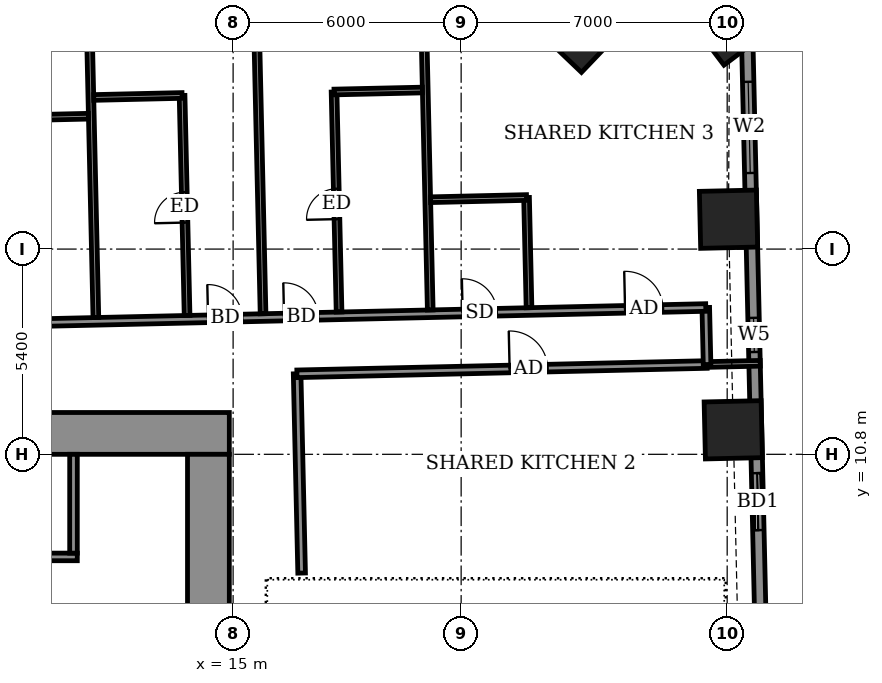
"""IFC4 building model, lengths in metres.
Left out: names, types, materials, properties, quantities, classifications, styles, units other than length and angle.
Written with IfcOpenShell. Run it as: python <this file> out.ifc"""

import sys

from ifc_helpers import new_model, si_unit, direction, frame, frame_2d, origin, origin_2d, place, context, subcontext, project, spatial, rectangle, extrude, element, fill, save


model = new_model("IFC4")
c1 = context("Model", 3, precision=1e-05, world=origin(), true_north=direction((0.0, 1.0)))
c2 = subcontext(c1, "Body", "Model", "MODEL_VIEW")
j1 = project(units=[si_unit("LENGTHUNIT", "METRE"), si_unit("PLANEANGLEUNIT", "RADIAN")], contexts=[c1])
p1 = place(None, origin())
s1 = spatial("IfcSite", under=j1, at=p1, CompositionType="ELEMENT")
p2 = place(p1, origin())
s2 = spatial("IfcBuilding", under=s1, at=p2, CompositionType="ELEMENT")
p3 = place(p2, frame((0.0, 0.0, 48.5)))
s3 = spatial("IfcBuildingStorey", under=s2, at=p3, CompositionType="ELEMENT", Elevation=48.5)
for number, where, z_axis, x_axis in (
    (1, (28.16, 11.445, -0.55), (0.0, 0.0, 1.0), (-0.023, 1.0, 0.0)),
    (2, (28.035, 16.986, -0.55), (0.0, 0.0, 1.0), (-0.023, 1.0, 0.0)),
    (3, (28.061, 22.09, -0.55), (0.0, 0.0, 1.0), (-0.604, 0.797, 0.0)),
    (4, (24.142, 21.91, -0.55), (0.0, 0.0, 1.0), (-0.723, 0.691, 0.0)),
):
    element("IfcColumn", number, at=place(p3, frame(where, z_axis=z_axis, x_axis=x_axis)), inside=s3, PredefinedType="COLUMN", context=c2, shape_type="SweptSolid", body=[
        extrude(rectangle(XDim=1.5, YDim=1.5, at=origin_2d()), origin(), (0.0, 0.0, 1.0), 3.6),
    ])
p4 = place(p3, frame((28.887, 5.864, 0.0), z_axis=(0.0, 0.0, 1.0), x_axis=(-0.022687182773, 0.999742612745, 0.0)))
e5 = element("IfcWall", 5, at=p4, inside=s3, PredefinedType="SOLIDWALL", context=c2, shape_type="SweptSolid", body=[
    extrude(rectangle(XDim=16.529, YDim=0.3, at=frame_2d((8.265, 0.0))), origin(), (0.0, 0.0, 1.0), 3.05),
])
p5 = place(p4, frame((2.942, 0.0, 0.0)))
e6 = element("IfcOpeningElement", 6, at=p5, cuts=e5, PredefinedType="OPENING", context=c2, shape_type="SweptSolid", body=[
    extrude(rectangle(XDim=1.5, YDim=2.4, at=frame_2d((0.75, 1.2))), frame((0.0, 0.16, 0.0), z_axis=(0.0, -1.0, 0.0), x_axis=(1.0, 0.0, 0.0)), (0.0, 0.0, 1.0), 0.32),
])
p6 = place(p4, frame((7.629, 0.0, 0.9)))
e7 = element("IfcOpeningElement", 7, at=p6, cuts=e5, PredefinedType="OPENING", context=c2, shape_type="SweptSolid", body=[
    extrude(rectangle(XDim=0.9, YDim=1.5, at=frame_2d((0.45, 0.75))), frame((0.0, 0.16, 0.0), z_axis=(0.0, -1.0, 0.0), x_axis=(1.0, 0.0, 0.0)), (0.0, 0.0, 1.0), 0.32),
])
p7 = place(p4, frame((12.341, 0.0, 0.9)))
e8 = element("IfcOpeningElement", 8, at=p7, cuts=e5, PredefinedType="OPENING", context=c2, shape_type="SweptSolid", body=[
    extrude(rectangle(XDim=2.4, YDim=1.5, at=frame_2d((1.2, 0.75))), frame((0.0, 0.16, 0.0), z_axis=(0.0, -1.0, 0.0), x_axis=(1.0, 0.0, 0.0)), (0.0, 0.0, 1.0), 0.32),
])
p8 = place(p3, frame((30.33, 6.201, 0.0), z_axis=(0.0, 0.0, 1.0), x_axis=(-0.022744303924, 0.999741314861, 0.0)))
e9 = element("IfcWall", 9, at=p8, inside=s3, PredefinedType="USERDEFINED", context=c2, shape_type="SweptSolid", body=[
    extrude(rectangle(XDim=3.875, YDim=0.55, at=frame_2d((1.938, 0.0))), origin(), (0.0, 0.0, 1.0), 0.8),
])
p9 = place(p3, frame((16.803, 7.675, 0.0), z_axis=(0.0, 0.0, 1.0), x_axis=(-0.022667483124, 0.999743059595, 0.0)))
e10 = element("IfcWall", 10, at=p9, inside=s3, PredefinedType="PARTITIONING", context=c2, shape_type="SweptSolid", body=[
    extrude(rectangle(XDim=5.245, YDim=0.2, at=frame_2d((2.623, 0.0))), origin(), (0.0, 0.0, 1.0), 3.05),
])
p10 = place(p3, frame((16.679, 12.918, 0.0), z_axis=(0.0, 0.0, 1.0), x_axis=(0.999742162372, 0.022707020428, 0.0)))
e11 = element("IfcWall", 11, at=p10, inside=s3, PredefinedType="PARTITIONING", context=c2, shape_type="SweptSolid", body=[
    extrude(rectangle(XDim=10.795, YDim=0.2, at=frame_2d((5.397, 0.0))), origin(), (0.0, 0.0, 1.0), 3.05),
])
p11 = place(p10, frame((5.598, 0.0, 0.0)))
e12 = element("IfcOpeningElement", 12, at=p11, cuts=e11, PredefinedType="OPENING", context=c2, shape_type="SweptSolid", body=[
    extrude(rectangle(XDim=1.0, YDim=2.1, at=frame_2d((0.5, 1.05))), frame((0.0, 0.11, 0.0), z_axis=(0.0, -1.0, 0.0), x_axis=(1.0, 0.0, 0.0)), (0.0, 0.0, 1.0), 0.22),
])
p12 = place(p3, frame((27.471, 13.163, 0.0), z_axis=(0.0, 0.0, 1.0), x_axis=(0.999739219063, 0.022836240226, 0.0)))
e13 = element("IfcWall", 13, at=p12, inside=s3, PredefinedType="PARTITIONING", context=c2, shape_type="SweptSolid", body=[
    extrude(rectangle(XDim=1.4, YDim=0.15, at=frame_2d((0.7, 0.0))), origin(), (0.0, 0.0, 1.0), 2.55),
])
p13 = place(p3, frame((27.471, 13.163, 0.0), z_axis=(0.0, 0.0, 1.0), x_axis=(-0.022617910375, 0.999744182344, 0.0)))
e14 = element("IfcWall", 14, at=p13, inside=s3, PredefinedType="PARTITIONING", context=c2, shape_type="SweptSolid", body=[
    extrude(rectangle(XDim=1.5, YDim=0.2, at=frame_2d((0.75, 0.0))), origin(), (0.0, 0.0, 1.0), 3.05),
])
p14 = place(p3, frame((-31.347, 13.329, 0.0), z_axis=(0.0, 0.0, 1.0), x_axis=(0.999742613079, 0.022687168058, 0.0)))
e15 = element("IfcWall", 15, at=p14, inside=s3, PredefinedType="PARTITIONING", context=c2, shape_type="SweptSolid", body=[
    extrude(rectangle(XDim=58.799, YDim=0.2, at=frame_2d((29.399, 0.0))), origin(), (0.0, 0.0, 1.0), 3.05),
])
p15 = place(p14, frame((56.675, 0.0, 0.0)))
e16 = element("IfcOpeningElement", 16, at=p15, cuts=e15, PredefinedType="OPENING", context=c2, shape_type="SweptSolid", body=[
    extrude(rectangle(XDim=1.0, YDim=2.1, at=frame_2d((0.5, 1.05))), frame((0.0, 0.11, 0.0), z_axis=(0.0, -1.0, 0.0), x_axis=(1.0, 0.0, 0.0)), (0.0, 0.0, 1.0), 0.22),
])
p16 = place(p14, frame((52.4, 0.0, 0.0)))
e17 = element("IfcOpeningElement", 17, at=p16, cuts=e15, PredefinedType="OPENING", context=c2, shape_type="SweptSolid", body=[
    extrude(rectangle(XDim=0.9, YDim=2.1, at=frame_2d((0.45, 1.05))), frame((0.0, 0.11, 0.0), z_axis=(0.0, -1.0, 0.0), x_axis=(1.0, 0.0, 0.0)), (0.0, 0.0, 1.0), 0.22),
])
p17 = place(p14, frame((47.7, 0.0, 0.0)))
e18 = element("IfcOpeningElement", 18, at=p17, cuts=e15, PredefinedType="OPENING", context=c2, shape_type="SweptSolid", body=[
    extrude(rectangle(XDim=0.9, YDim=2.1, at=frame_2d((0.45, 1.05))), frame((0.0, 0.11, 0.0), z_axis=(0.0, -1.0, 0.0), x_axis=(1.0, 0.0, 0.0)), (0.0, 0.0, 1.0), 0.22),
])
p18 = place(p14, frame((45.7, 0.0, 0.0)))
e19 = element("IfcOpeningElement", 19, at=p18, cuts=e15, PredefinedType="OPENING", context=c2, shape_type="SweptSolid", body=[
    extrude(rectangle(XDim=0.9, YDim=2.1, at=frame_2d((0.45, 1.05))), frame((0.0, 0.11, 0.0), z_axis=(0.0, -1.0, 0.0), x_axis=(1.0, 0.0, 0.0)), (0.0, 0.0, 1.0), 0.22),
])
p19 = place(p14, frame((38.95, 0.0, 0.0)))
e20 = element("IfcOpeningElement", 20, at=p19, cuts=e15, PredefinedType="OPENING", context=c2, shape_type="SweptSolid", body=[
    extrude(rectangle(XDim=0.9, YDim=2.1, at=frame_2d((0.45, 1.05))), frame((0.0, 0.11, 0.0), z_axis=(0.0, -1.0, 0.0), x_axis=(1.0, 0.0, 0.0)), (0.0, 0.0, 1.0), 0.22),
])
p20 = place(p14, frame((37.05, 0.0, 0.0)))
e21 = element("IfcOpeningElement", 21, at=p20, cuts=e15, PredefinedType="OPENING", context=c2, shape_type="SweptSolid", body=[
    extrude(rectangle(XDim=0.9, YDim=2.1, at=frame_2d((0.45, 1.05))), frame((0.0, 0.11, 0.0), z_axis=(0.0, -1.0, 0.0), x_axis=(1.0, 0.0, 0.0)), (0.0, 0.0, 1.0), 0.22),
])
p21 = place(p14, frame((30.375, 0.0, 0.0)))
e22 = element("IfcOpeningElement", 22, at=p21, cuts=e15, PredefinedType="OPENING", context=c2, shape_type="SweptSolid", body=[
    extrude(rectangle(XDim=0.9, YDim=2.1, at=frame_2d((0.45, 1.05))), frame((0.0, 0.11, 0.0), z_axis=(0.0, -1.0, 0.0), x_axis=(1.0, 0.0, 0.0)), (0.0, 0.0, 1.0), 0.22),
])
p22 = place(p14, frame((28.5, 0.0, 0.0)))
e23 = element("IfcOpeningElement", 23, at=p22, cuts=e15, PredefinedType="OPENING", context=c2, shape_type="SweptSolid", body=[
    extrude(rectangle(XDim=0.9, YDim=2.1, at=frame_2d((0.45, 1.05))), frame((0.0, 0.11, 0.0), z_axis=(0.0, -1.0, 0.0), x_axis=(1.0, 0.0, 0.0)), (0.0, 0.0, 1.0), 0.22),
])
p23 = place(p14, frame((21.825, 0.0, 0.0)))
e24 = element("IfcOpeningElement", 24, at=p23, cuts=e15, PredefinedType="OPENING", context=c2, shape_type="SweptSolid", body=[
    extrude(rectangle(XDim=0.9, YDim=2.1, at=frame_2d((0.45, 1.05))), frame((0.0, 0.11, 0.0), z_axis=(0.0, -1.0, 0.0), x_axis=(1.0, 0.0, 0.0)), (0.0, 0.0, 1.0), 0.22),
])
p24 = place(p14, frame((19.95, 0.0, 0.0)))
e25 = element("IfcOpeningElement", 25, at=p24, cuts=e15, PredefinedType="OPENING", context=c2, shape_type="SweptSolid", body=[
    extrude(rectangle(XDim=0.9, YDim=2.1, at=frame_2d((0.45, 1.05))), frame((0.0, 0.11, 0.0), z_axis=(0.0, -1.0, 0.0), x_axis=(1.0, 0.0, 0.0)), (0.0, 0.0, 1.0), 0.22),
])
p25 = place(p14, frame((13.225, 0.0, 0.0)))
e26 = element("IfcOpeningElement", 26, at=p25, cuts=e15, PredefinedType="OPENING", context=c2, shape_type="SweptSolid", body=[
    extrude(rectangle(XDim=0.9, YDim=2.1, at=frame_2d((0.45, 1.05))), frame((0.0, 0.11, 0.0), z_axis=(0.0, -1.0, 0.0), x_axis=(1.0, 0.0, 0.0)), (0.0, 0.0, 1.0), 0.22),
])
p26 = place(p14, frame((11.25, 0.0, 0.0)))
e27 = element("IfcOpeningElement", 27, at=p26, cuts=e15, PredefinedType="OPENING", context=c2, shape_type="SweptSolid", body=[
    extrude(rectangle(XDim=0.9, YDim=2.1, at=frame_2d((0.45, 1.05))), frame((0.0, 0.11, 0.0), z_axis=(0.0, -1.0, 0.0), x_axis=(1.0, 0.0, 0.0)), (0.0, 0.0, 1.0), 0.22),
])
p27 = place(p14, frame((1.75, 0.0, 0.0)))
e28 = element("IfcOpeningElement", 28, at=p27, cuts=e15, PredefinedType="OPENING", context=c2, shape_type="SweptSolid", body=[
    extrude(rectangle(XDim=1.0, YDim=2.1, at=frame_2d((0.5, 1.05))), frame((0.0, 0.11, 0.0), z_axis=(0.0, -1.0, 0.0), x_axis=(1.0, 0.0, 0.0)), (0.0, 0.0, 1.0), 0.22),
])
p28 = place(p14, frame((6.65, 0.0, 0.0)))
e29 = element("IfcOpeningElement", 29, at=p28, cuts=e15, PredefinedType="OPENING", context=c2, shape_type="SweptSolid", body=[
    extrude(rectangle(XDim=0.9, YDim=2.1, at=frame_2d((0.45, 1.05))), frame((0.0, 0.11, 0.0), z_axis=(0.0, -1.0, 0.0), x_axis=(1.0, 0.0, 0.0)), (0.0, 0.0, 1.0), 0.22),
])
p29 = place(p3, frame((11.389, 14.399, 0.0), z_axis=(0.0, 0.0, 1.0), x_axis=(-0.022708327922, 0.999742132674, 0.0)))
e30 = element("IfcWall", 30, at=p29, inside=s3, PredefinedType="PARTITIONING", context=c2, shape_type="SweptSolid", body=[
    extrude(rectangle(XDim=11.45, YDim=0.15, at=frame_2d((5.725, 0.0))), origin(), (0.0, 0.0, 1.0), 3.05),
])
p30 = place(p3, frame((13.789, 14.453, 0.0), z_axis=(0.0, 0.0, 1.0), x_axis=(-0.022809516176, 0.999739829141, 0.0)))
e31 = element("IfcWall", 31, at=p30, inside=s3, PredefinedType="PARTITIONING", context=c2, shape_type="SweptSolid", body=[
    extrude(rectangle(XDim=5.791, YDim=0.15, at=frame_2d((2.895, 0.0))), origin(), (0.0, 0.0, 1.0), 3.05),
])
p31 = place(p30, frame((2.445, 0.0, 0.0)))
e32 = element("IfcOpeningElement", 32, at=p31, cuts=e31, PredefinedType="OPENING", context=c2, shape_type="SweptSolid", body=[
    extrude(rectangle(XDim=0.8, YDim=2.1, at=frame_2d((0.4, 1.05))), frame((0.0, 0.085, 0.0), z_axis=(0.0, -1.0, 0.0), x_axis=(1.0, 0.0, 0.0)), (0.0, 0.0, 1.0), 0.17),
])
p32 = place(p3, frame((15.788, 14.499, 0.0), z_axis=(0.0, 0.0, 1.0), x_axis=(-0.022708327922, 0.999742132674, 0.0)))
e33 = element("IfcWall", 33, at=p32, inside=s3, PredefinedType="PARTITIONING", context=c2, shape_type="SweptSolid", body=[
    extrude(rectangle(XDim=11.45, YDim=0.15, at=frame_2d((5.725, 0.0))), origin(), (0.0, 0.0, 1.0), 2.55),
])
p33 = place(p3, frame((17.788, 14.544, 0.0), z_axis=(0.0, 0.0, 1.0), x_axis=(-0.022809516176, 0.999739829141, 0.0)))
e34 = element("IfcWall", 34, at=p33, inside=s3, PredefinedType="PARTITIONING", context=c2, shape_type="SweptSolid", body=[
    extrude(rectangle(XDim=5.791, YDim=0.15, at=frame_2d((2.895, 0.0))), origin(), (0.0, 0.0, 1.0), 3.05),
])
p34 = place(p33, frame((2.445, 0.0, 0.0)))
e35 = element("IfcOpeningElement", 35, at=p34, cuts=e34, PredefinedType="OPENING", context=c2, shape_type="SweptSolid", body=[
    extrude(rectangle(XDim=0.8, YDim=2.1, at=frame_2d((0.4, 1.05))), frame((0.0, 0.085, 0.0), z_axis=(0.0, -1.0, 0.0), x_axis=(1.0, 0.0, 0.0)), (0.0, 0.0, 1.0), 0.17),
])
p35 = place(p3, frame((20.187, 14.598, 0.0), z_axis=(0.0, 0.0, 1.0), x_axis=(-0.022706391805, 0.999742176649, 0.0)))
e36 = element("IfcWall", 36, at=p35, inside=s3, PredefinedType="PARTITIONING", context=c2, shape_type="SweptSolid", body=[
    extrude(rectangle(XDim=11.451, YDim=0.15, at=frame_2d((5.726, 0.0))), origin(), (0.0, 0.0, 1.0), 2.55),
])
p36 = place(p3, frame((22.786, 14.657, 0.0), z_axis=(0.0, 0.0, 1.0), x_axis=(-0.022388729138, 0.999749340989, 0.0)))
e37 = element("IfcWall", 37, at=p36, inside=s3, PredefinedType="PARTITIONING", context=c2, shape_type="SweptSolid", body=[
    extrude(rectangle(XDim=2.901, YDim=0.15, at=frame_2d((1.45, 0.0))), origin(), (0.0, 0.0, 1.0), 3.05),
])
p37 = place(p3, frame((20.196, 17.499, 0.0), z_axis=(0.0, 0.0, 1.0), x_axis=(0.999737525802, 0.022910248851, 0.0)))
e38 = element("IfcWall", 38, at=p37, inside=s3, PredefinedType="PARTITIONING", context=c2, shape_type="SweptSolid", body=[
    extrude(rectangle(XDim=2.526, YDim=0.15, at=frame_2d((1.263, 0.0))), origin(), (0.0, 0.0, 1.0), 3.05),
])
for number, where, z_axis, x_axis in (
    (39, (8.87, 19.643, 0.0), (0.0, 0.0, 1.0), (1.0, 0.023, 0.0)),
    (40, (11.333, 20.189, 0.0), (0.0, 0.0, 1.0), (1.0, 0.023, 0.0)),
):
    element("IfcWall", number, at=place(p3, frame(where, z_axis=z_axis, x_axis=x_axis)), inside=s3, PredefinedType="PARTITIONING", context=c2, shape_type="SweptSolid", body=[
        extrude(rectangle(XDim=2.324, YDim=0.15, at=frame_2d((1.162, 0.0))), origin(), (0.0, 0.0, 1.0), 3.05),
    ])
p38 = place(p3, frame((17.656, 20.333, 0.0), z_axis=(0.0, 0.0, 1.0), x_axis=(0.999749954681, 0.022361308448, 0.0)))
e41 = element("IfcWall", 41, at=p38, inside=s3, PredefinedType="PARTITIONING", context=c2, shape_type="SweptSolid", body=[
    extrude(rectangle(XDim=2.325, YDim=0.15, at=frame_2d((1.163, 0.0))), origin(), (0.0, 0.0, 1.0), 3.05),
])
p39 = place(p3, frame((-14.9, 11.35, 0.0), z_axis=(0.0, 0.0, 1.0), x_axis=(1.0, 0.0, 0.0)))
e42 = element("IfcWall", 42, at=p39, inside=s3, PredefinedType="SHEAR", context=c2, shape_type="SweptSolid", body=[
    extrude(rectangle(XDim=29.8, YDim=1.1, at=frame_2d((14.9, 0.0))), origin(), (0.0, 0.0, 1.0), 3.6),
])
p40 = place(p3, frame((14.35, -10.8, 0.0), z_axis=(0.0, 0.0, 1.0), x_axis=(0.0, 1.0, 0.0)))
e43 = element("IfcWall", 43, at=p40, inside=s3, PredefinedType="SHEAR", context=c2, shape_type="SweptSolid", body=[
    extrude(rectangle(XDim=21.6, YDim=1.1, at=frame_2d((10.8, 0.0))), origin(), (0.0, 0.0, 1.0), 3.6),
])
p41 = place(p40, frame((1.2, 0.0, 0.0)))
e44 = element("IfcOpeningElement", 44, at=p41, cuts=e43, PredefinedType="OPENING", context=c2, shape_type="SweptSolid", body=[
    extrude(rectangle(XDim=1.2, YDim=2.1, at=frame_2d((0.6, 1.05))), frame((0.0, 0.56, 0.0), z_axis=(0.0, -1.0, 0.0), x_axis=(1.0, 0.0, 0.0)), (0.0, 0.0, 1.0), 1.12),
])
p42 = place(p3, frame((-10.9, 8.1, 0.0), z_axis=(0.0, 0.0, 1.0), x_axis=(1.0, 0.0, 0.0)))
e45 = element("IfcWall", 45, at=p42, inside=s3, PredefinedType="SHEAR", context=c2, shape_type="SweptSolid", body=[
    extrude(rectangle(XDim=21.8, YDim=0.2, at=frame_2d((10.9, 0.0))), origin(), (0.0, 0.0, 1.0), 3.05),
])
p43 = place(p42, frame((0.9, 0.0, 0.0)))
e46 = element("IfcOpeningElement", 46, at=p43, cuts=e45, PredefinedType="OPENING", context=c2, shape_type="SweptSolid", body=[
    extrude(rectangle(XDim=1.1, YDim=2.1, at=frame_2d((0.55, 1.05))), frame((0.0, 0.11, 0.0), z_axis=(0.0, -1.0, 0.0), x_axis=(1.0, 0.0, 0.0)), (0.0, 0.0, 1.0), 0.22),
])
p44 = place(p42, frame((3.6, 0.0, 0.0)))
e47 = element("IfcOpeningElement", 47, at=p44, cuts=e45, PredefinedType="OPENING", context=c2, shape_type="SweptSolid", body=[
    extrude(rectangle(XDim=1.1, YDim=2.1, at=frame_2d((0.55, 1.05))), frame((0.0, 0.11, 0.0), z_axis=(0.0, -1.0, 0.0), x_axis=(1.0, 0.0, 0.0)), (0.0, 0.0, 1.0), 0.22),
])
p45 = place(p42, frame((6.3, 0.0, 0.0)))
e48 = element("IfcOpeningElement", 48, at=p45, cuts=e45, PredefinedType="OPENING", context=c2, shape_type="SweptSolid", body=[
    extrude(rectangle(XDim=1.1, YDim=2.1, at=frame_2d((0.55, 1.05))), frame((0.0, 0.11, 0.0), z_axis=(0.0, -1.0, 0.0), x_axis=(1.0, 0.0, 0.0)), (0.0, 0.0, 1.0), 0.22),
])
p46 = place(p42, frame((9.0, 0.0, 0.0)))
e49 = element("IfcOpeningElement", 49, at=p46, cuts=e45, PredefinedType="OPENING", context=c2, shape_type="SweptSolid", body=[
    extrude(rectangle(XDim=1.1, YDim=2.1, at=frame_2d((0.55, 1.05))), frame((0.0, 0.11, 0.0), z_axis=(0.0, -1.0, 0.0), x_axis=(1.0, 0.0, 0.0)), (0.0, 0.0, 1.0), 0.22),
])
p47 = place(p42, frame((11.7, 0.0, 0.0)))
e50 = element("IfcOpeningElement", 50, at=p47, cuts=e45, PredefinedType="OPENING", context=c2, shape_type="SweptSolid", body=[
    extrude(rectangle(XDim=1.1, YDim=2.1, at=frame_2d((0.55, 1.05))), frame((0.0, 0.11, 0.0), z_axis=(0.0, -1.0, 0.0), x_axis=(1.0, 0.0, 0.0)), (0.0, 0.0, 1.0), 0.22),
])
p48 = place(p42, frame((14.5, 0.0, 0.0)))
e51 = element("IfcOpeningElement", 51, at=p48, cuts=e45, PredefinedType="OPENING", context=c2, shape_type="SweptSolid", body=[
    extrude(rectangle(XDim=0.9, YDim=2.1, at=frame_2d((0.45, 1.05))), frame((0.0, 0.11, 0.0), z_axis=(0.0, -1.0, 0.0), x_axis=(1.0, 0.0, 0.0)), (0.0, 0.0, 1.0), 0.22),
])
p49 = place(p42, frame((18.55, 0.0, 0.0)))
e52 = element("IfcOpeningElement", 52, at=p49, cuts=e45, PredefinedType="OPENING", context=c2, shape_type="SweptSolid", body=[
    extrude(rectangle(XDim=0.9, YDim=2.1, at=frame_2d((0.45, 1.05))), frame((0.0, 0.11, 0.0), z_axis=(0.0, -1.0, 0.0), x_axis=(1.0, 0.0, 0.0)), (0.0, 0.0, 1.0), 0.22),
])
p50 = place(p3, frame((10.8, 8.2, 0.0), z_axis=(0.0, 0.0, 1.0), x_axis=(0.0, 1.0, 0.0)))
e53 = element("IfcWall", 53, at=p50, inside=s3, PredefinedType="STANDARD", context=c2, shape_type="SweptSolid", body=[
    extrude(rectangle(XDim=2.6, YDim=0.2, at=frame_2d((1.3, 0.0))), origin(), (0.0, 0.0, 1.0), 3.05),
])
p51 = place(p5, origin())
e54 = element("IfcDoor", 54, at=p51, inside=s3, OperationType="SLIDING_TO_LEFT", PredefinedType="DOOR", context=c2, shape_type="SweptSolid", body=[
    extrude(rectangle(XDim=1.5, YDim=2.4, at=frame_2d((0.75, 1.2))), frame((0.0, 0.025, 0.0), z_axis=(0.0, -1.0, 0.0), x_axis=(1.0, 0.0, 0.0)), (0.0, 0.0, 1.0), 0.05),
])
fill(e6, e54)
p52 = place(p6, origin())
e55 = element("IfcWindow", 55, at=p52, inside=s3, PartitioningType="SINGLE_PANEL", PredefinedType="WINDOW", context=c2, shape_type="SweptSolid", body=[
    extrude(rectangle(XDim=0.9, YDim=1.5, at=frame_2d((0.45, 0.75))), frame((0.0, 0.03, 0.0), z_axis=(0.0, -1.0, 0.0), x_axis=(1.0, 0.0, 0.0)), (0.0, 0.0, 1.0), 0.06),
])
fill(e7, e55)
p53 = place(p7, origin())
e56 = element("IfcWindow", 56, at=p53, inside=s3, PartitioningType="DOUBLE_PANEL_VERTICAL", PredefinedType="WINDOW", context=c2, shape_type="SweptSolid", body=[
    extrude(rectangle(XDim=2.4, YDim=1.5, at=frame_2d((1.2, 0.75))), frame((0.0, 0.03, 0.0), z_axis=(0.0, -1.0, 0.0), x_axis=(1.0, 0.0, 0.0)), (0.0, 0.0, 1.0), 0.06),
])
fill(e8, e56)
p54 = place(p11, origin())
e57 = element("IfcDoor", 57, at=p54, inside=s3, OperationType="SINGLE_SWING_LEFT", PredefinedType="DOOR", context=c2, shape_type="SweptSolid", body=[
    extrude(rectangle(XDim=1.0, YDim=2.1, at=frame_2d((0.5, 1.05))), frame((0.0, 0.025, 0.0), z_axis=(0.0, -1.0, 0.0), x_axis=(1.0, 0.0, 0.0)), (0.0, 0.0, 1.0), 0.05),
])
fill(e12, e57)
p55 = place(p15, origin())
e58 = element("IfcDoor", 58, at=p55, inside=s3, OperationType="SINGLE_SWING_RIGHT", PredefinedType="DOOR", context=c2, shape_type="SweptSolid", body=[
    extrude(rectangle(XDim=1.0, YDim=2.1, at=frame_2d((0.5, 1.05))), frame((0.0, 0.025, 0.0), z_axis=(0.0, -1.0, 0.0), x_axis=(1.0, 0.0, 0.0)), (0.0, 0.0, 1.0), 0.05),
])
fill(e16, e58)
p56 = place(p16, origin())
e59 = element("IfcDoor", 59, at=p56, inside=s3, OperationType="SINGLE_SWING_RIGHT", PredefinedType="DOOR", context=c2, shape_type="SweptSolid", body=[
    extrude(rectangle(XDim=0.9, YDim=2.1, at=frame_2d((0.45, 1.05))), frame((0.0, 0.025, 0.0), z_axis=(0.0, -1.0, 0.0), x_axis=(1.0, 0.0, 0.0)), (0.0, 0.0, 1.0), 0.05),
])
fill(e17, e59)
p57 = place(p17, origin())
e60 = element("IfcDoor", 60, at=p57, inside=s3, OperationType="SINGLE_SWING_RIGHT", PredefinedType="DOOR", context=c2, shape_type="SweptSolid", body=[
    extrude(rectangle(XDim=0.9, YDim=2.1, at=frame_2d((0.45, 1.05))), frame((0.0, 0.025, 0.0), z_axis=(0.0, -1.0, 0.0), x_axis=(1.0, 0.0, 0.0)), (0.0, 0.0, 1.0), 0.05),
])
fill(e18, e60)
p58 = place(p34, origin())
e61 = element("IfcDoor", 61, at=p58, inside=s3, OperationType="SINGLE_SWING_RIGHT", PredefinedType="DOOR", context=c2, shape_type="SweptSolid", body=[
    extrude(rectangle(XDim=0.8, YDim=2.1, at=frame_2d((0.4, 1.05))), frame((0.0, 0.025, 0.0), z_axis=(0.0, -1.0, 0.0), x_axis=(1.0, 0.0, 0.0)), (0.0, 0.0, 1.0), 0.05),
])
fill(e35, e61)
p59 = place(p18, origin())
e62 = element("IfcDoor", 62, at=p59, inside=s3, OperationType="SINGLE_SWING_LEFT", PredefinedType="DOOR", context=c2, shape_type="SweptSolid", body=[
    extrude(rectangle(XDim=0.9, YDim=2.1, at=frame_2d((0.45, 1.05))), frame((0.0, 0.025, 0.0), z_axis=(0.0, -1.0, 0.0), x_axis=(1.0, 0.0, 0.0)), (0.0, 0.0, 1.0), 0.05),
])
fill(e19, e62)
p60 = place(p31, origin())
e63 = element("IfcDoor", 63, at=p60, inside=s3, OperationType="SINGLE_SWING_LEFT", PredefinedType="DOOR", context=c2, shape_type="SweptSolid", body=[
    extrude(rectangle(XDim=0.8, YDim=2.1, at=frame_2d((0.4, 1.05))), frame((0.0, 0.025, 0.0), z_axis=(0.0, -1.0, 0.0), x_axis=(1.0, 0.0, 0.0)), (0.0, 0.0, 1.0), 0.05),
])
fill(e32, e63)
save(model, sys.argv[1])
